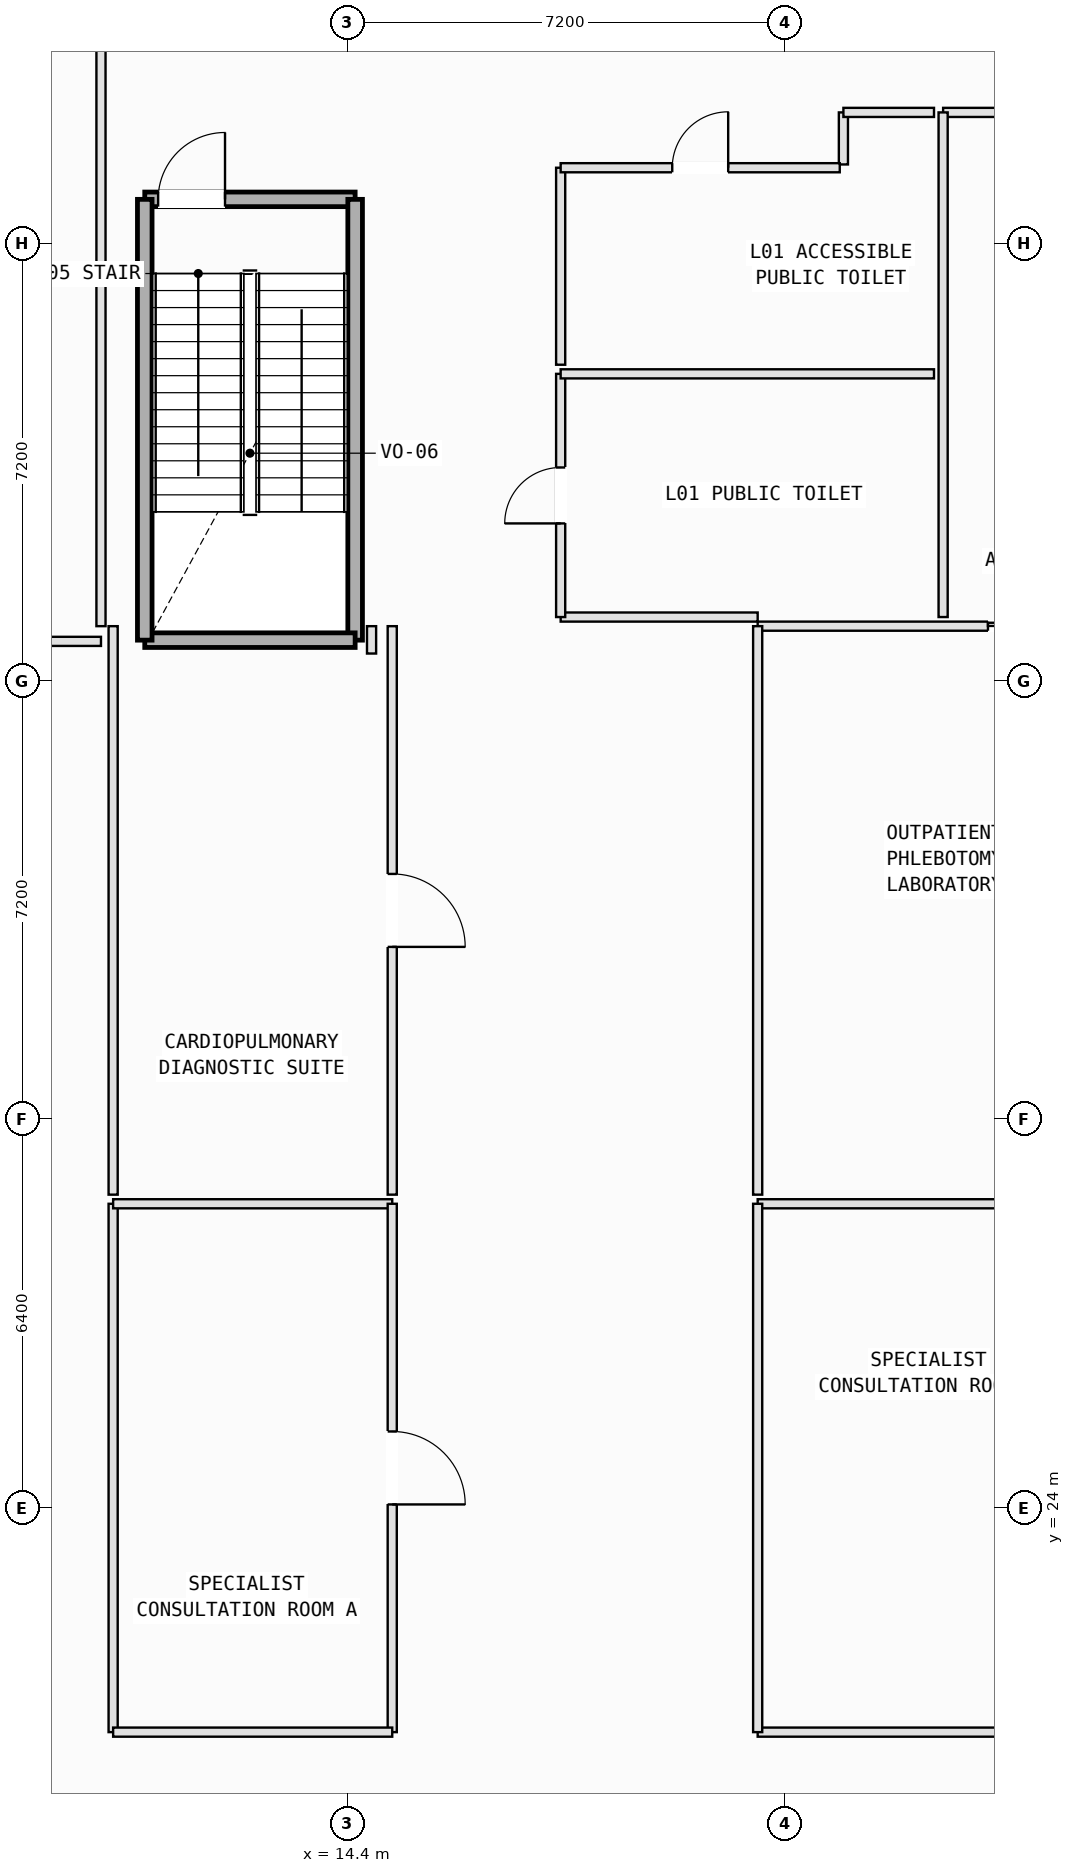
"""IFC4 building model, lengths in metres.
Left out: names, types, materials, properties, quantities, classifications, styles, units other than length and angle.
Written with IfcOpenShell. Run it as: python <this file> out.ifc"""

import sys

from ifc_helpers import new_model, si_unit, direction, frame, frame_2d, origin, place, context, subcontext, project, spatial, rectangle, extrude, element, fill, save


model = new_model("IFC4")
c1 = context("Model", 3, precision=1e-05, world=origin(), true_north=direction((0.0, 1.0)))
c2 = subcontext(c1, "Body", "Model", "MODEL_VIEW")
j1 = project(units=[si_unit("LENGTHUNIT", "METRE"), si_unit("PLANEANGLEUNIT", "RADIAN")], contexts=[c1])
p1 = place(None, origin())
s1 = spatial("IfcSite", under=j1, at=p1, CompositionType="ELEMENT")
p2 = place(p1, origin())
s2 = spatial("IfcBuilding", under=s1, at=p2, CompositionType="ELEMENT")
p3 = place(p2, frame((0.0, 0.0, 5.4)))
s3 = spatial("IfcBuildingStorey", under=s2, at=p3, CompositionType="ELEMENT", Elevation=5.4)
p4 = place(p3, frame((11.07, 45.52, 0.0), z_axis=(0.0, 0.0, 1.0), x_axis=(1.0, 0.0, 0.0)))
e1 = element("IfcWall", 1, at=p4, inside=s3, PredefinedType="SOLIDWALL", context=c2, shape_type="SweptSolid", body=[
    extrude(rectangle(XDim=3.46, YDim=0.24, at=frame_2d((1.73, 0.0))), origin(), (0.0, 0.0, 1.0), 5.15),
])
p5 = place(p4, frame((0.22, 0.0, 0.0)))
e2 = element("IfcOpeningElement", 2, at=p5, cuts=e1, PredefinedType="OPENING", context=c2, shape_type="SweptSolid", body=[
    extrude(rectangle(XDim=1.1, YDim=2.15, at=frame_2d((0.55, 1.075))), frame((0.0, 0.13, 0.0), z_axis=(0.0, -1.0, 0.0), x_axis=(1.0, 0.0, 0.0)), (0.0, 0.0, 1.0), 0.26),
])
p6 = place(p3, frame((14.53, 45.52, 0.0), z_axis=(0.0, 0.0, 1.0), x_axis=(0.0, -1.0, 0.0)))
e3 = element("IfcWall", 3, at=p6, inside=s3, PredefinedType="SOLIDWALL", context=c2, shape_type="SweptSolid", body=[
    extrude(rectangle(XDim=7.25, YDim=0.24, at=frame_2d((3.625, 0.0))), origin(), (0.0, 0.0, 1.0), 5.15),
])
p7 = place(p3, frame((14.53, 38.27, 0.0), z_axis=(0.0, 0.0, 1.0), x_axis=(-1.0, 0.0, 0.0)))
e4 = element("IfcWall", 4, at=p7, inside=s3, PredefinedType="SOLIDWALL", context=c2, shape_type="SweptSolid", body=[
    extrude(rectangle(XDim=3.46, YDim=0.24, at=frame_2d((1.73, 0.0))), origin(), (0.0, 0.0, 1.0), 5.15),
])
p8 = place(p3, frame((11.07, 38.27, 0.0), z_axis=(0.0, 0.0, 1.0), x_axis=(0.0, 1.0, 0.0)))
e5 = element("IfcWall", 5, at=p8, inside=s3, PredefinedType="SOLIDWALL", context=c2, shape_type="SweptSolid", body=[
    extrude(rectangle(XDim=7.25, YDim=0.24, at=frame_2d((3.625, 0.0))), origin(), (0.0, 0.0, 1.0), 5.15),
])
p9 = place(p3, frame((10.55, 20.31, 0.0), z_axis=(0.0, 0.0, 1.0), x_axis=(0.0, 1.0, 0.0)))
e6 = element("IfcWall", 6, at=p9, inside=s3, PredefinedType="PARTITIONING", context=c2, shape_type="SweptSolid", body=[
    extrude(rectangle(XDim=8.69, YDim=0.15, at=frame_2d((4.345, 0.0))), origin(), (0.0, 0.0, 1.0), 5.15),
])
p10 = place(p3, frame((10.55, 29.0, 0.0), z_axis=(0.0, 0.0, 1.0), x_axis=(1.0, 0.0, 0.0)))
e7 = element("IfcWall", 7, at=p10, inside=s3, PredefinedType="PARTITIONING", context=c2, shape_type="SweptSolid", body=[
    extrude(rectangle(XDim=4.59, YDim=0.15, at=frame_2d((2.295, 0.0))), origin(), (0.0, 0.0, 1.0), 5.15),
])
p11 = place(p3, frame((15.14, 29.0, 0.0), z_axis=(0.0, 0.0, 1.0), x_axis=(0.0, -1.0, 0.0)))
e8 = element("IfcWall", 8, at=p11, inside=s3, PredefinedType="PARTITIONING", context=c2, shape_type="SweptSolid", body=[
    extrude(rectangle(XDim=8.69, YDim=0.15, at=frame_2d((4.345, 0.0))), origin(), (0.0, 0.0, 1.0), 5.15),
])
p12 = place(p11, frame((3.745, 0.0, 0.0)))
e9 = element("IfcOpeningElement", 9, at=p12, cuts=e8, PredefinedType="OPENING", context=c2, shape_type="SweptSolid", body=[
    extrude(rectangle(XDim=1.2, YDim=2.15, at=frame_2d((0.6, 1.075))), frame((0.0, 0.085, 0.0), z_axis=(0.0, -1.0, 0.0), x_axis=(1.0, 0.0, 0.0)), (0.0, 0.0, 1.0), 0.17),
])
p13 = place(p3, frame((15.14, 20.31, 0.0), z_axis=(0.0, 0.0, 1.0), x_axis=(-1.0, 0.0, 0.0)))
e10 = element("IfcWall", 10, at=p13, inside=s3, PredefinedType="PARTITIONING", context=c2, shape_type="SweptSolid", body=[
    extrude(rectangle(XDim=4.59, YDim=0.15, at=frame_2d((2.295, 0.0))), origin(), (0.0, 0.0, 1.0), 5.15),
])
p14 = place(p3, frame((21.15, 29.0, 0.0), z_axis=(0.0, 0.0, 1.0), x_axis=(1.0, 0.0, 0.0)))
e11 = element("IfcWall", 11, at=p14, inside=s3, PredefinedType="PARTITIONING", context=c2, shape_type="SweptSolid", body=[
    extrude(rectangle(XDim=10.65, YDim=0.15, at=frame_2d((5.325, 0.0))), origin(), (0.0, 0.0, 1.0), 5.15),
])
p15 = place(p3, frame((31.8, 20.31, 0.0), z_axis=(0.0, 0.0, 1.0), x_axis=(-1.0, 0.0, 0.0)))
e12 = element("IfcWall", 12, at=p15, inside=s3, PredefinedType="PARTITIONING", context=c2, shape_type="SweptSolid", body=[
    extrude(rectangle(XDim=10.65, YDim=0.15, at=frame_2d((5.325, 0.0))), origin(), (0.0, 0.0, 1.0), 5.15),
])
p16 = place(p15, frame((4.725, 0.0, 0.0)))
e13 = element("IfcOpeningElement", 13, at=p16, cuts=e12, PredefinedType="OPENING", context=c2, shape_type="SweptSolid", body=[
    extrude(rectangle(XDim=1.2, YDim=2.15, at=frame_2d((0.6, 1.075))), frame((0.0, 0.085, 0.0), z_axis=(0.0, -1.0, 0.0), x_axis=(1.0, 0.0, 0.0)), (0.0, 0.0, 1.0), 0.17),
])
p17 = place(p3, frame((21.15, 20.31, 0.0), z_axis=(0.0, 0.0, 1.0), x_axis=(0.0, 1.0, 0.0)))
e14 = element("IfcWall", 14, at=p17, inside=s3, PredefinedType="PARTITIONING", context=c2, shape_type="SweptSolid", body=[
    extrude(rectangle(XDim=8.69, YDim=0.15, at=frame_2d((4.345, 0.0))), origin(), (0.0, 0.0, 1.0), 5.15),
])
p18 = place(p3, frame((10.55, 29.15, 0.0), z_axis=(0.0, 0.0, 1.0), x_axis=(0.0, 1.0, 0.0)))
e15 = element("IfcWall", 15, at=p18, inside=s3, PredefinedType="PARTITIONING", context=c2, shape_type="SweptSolid", body=[
    extrude(rectangle(XDim=9.35, YDim=0.15, at=frame_2d((4.675, 0.0))), origin(), (0.0, 0.0, 1.0), 5.15),
])
p19 = place(p3, frame((14.8, 38.05, 0.0), z_axis=(0.0, 0.0, 1.0), x_axis=(0.0, 1.0, 0.0)))
e16 = element("IfcWall", 16, at=p19, inside=s3, PredefinedType="PARTITIONING", context=c2, shape_type="SweptSolid", body=[
    extrude(rectangle(XDim=0.45, YDim=0.15, at=frame_2d((0.225, 0.0))), origin(), (0.0, 0.0, 1.0), 5.15),
])
p20 = place(p3, frame((15.14, 38.5, 0.0), z_axis=(0.0, 0.0, 1.0), x_axis=(0.0, -1.0, 0.0)))
e17 = element("IfcWall", 17, at=p20, inside=s3, PredefinedType="PARTITIONING", context=c2, shape_type="SweptSolid", body=[
    extrude(rectangle(XDim=9.35, YDim=0.15, at=frame_2d((4.675, 0.0))), origin(), (0.0, 0.0, 1.0), 5.15),
])
p21 = place(p20, frame((4.075, 0.0, 0.0)))
e18 = element("IfcOpeningElement", 18, at=p21, cuts=e17, PredefinedType="OPENING", context=c2, shape_type="SweptSolid", body=[
    extrude(rectangle(XDim=1.2, YDim=2.15, at=frame_2d((0.6, 1.075))), frame((0.0, 0.085, 0.0), z_axis=(0.0, -1.0, 0.0), x_axis=(1.0, 0.0, 0.0)), (0.0, 0.0, 1.0), 0.17),
])
p22 = place(p3, frame((21.15, 38.5, 0.0), z_axis=(0.0, 0.0, 1.0), x_axis=(1.0, 0.0, 0.0)))
e19 = element("IfcWall", 19, at=p22, inside=s3, PredefinedType="PARTITIONING", context=c2, shape_type="SweptSolid", body=[
    extrude(rectangle(XDim=10.65, YDim=0.15, at=frame_2d((5.325, 0.0))), origin(), (0.0, 0.0, 1.0), 5.15),
])
p23 = place(p22, frame((3.787, 0.0, 0.0)))
e20 = element("IfcOpeningElement", 20, at=p23, cuts=e19, PredefinedType="OPENING", context=c2, shape_type="SweptSolid", body=[
    extrude(rectangle(XDim=0.86, YDim=2.06, at=frame_2d((0.43, 1.03))), frame((0.0, 0.085, 0.0), z_axis=(0.0, -1.0, 0.0), x_axis=(1.0, 0.0, 0.0)), (0.0, 0.0, 1.0), 0.17),
])
p24 = place(p3, frame((21.15, 29.15, 0.0), z_axis=(0.0, 0.0, 1.0), x_axis=(0.0, 1.0, 0.0)))
e21 = element("IfcWall", 21, at=p24, inside=s3, PredefinedType="PARTITIONING", context=c2, shape_type="SweptSolid", body=[
    extrude(rectangle(XDim=9.35, YDim=0.15, at=frame_2d((4.675, 0.0))), origin(), (0.0, 0.0, 1.0), 5.15),
])
p25 = place(p3, frame((24.2, 46.95, 0.0), z_axis=(0.0, 0.0, 1.0), x_axis=(1.0, 0.0, 0.0)))
e22 = element("IfcWall", 22, at=p25, inside=s3, PredefinedType="PARTITIONING", context=c2, shape_type="SweptSolid", body=[
    extrude(rectangle(XDim=7.6, YDim=0.15, at=frame_2d((3.8, 0.0))), origin(), (0.0, 0.0, 1.0), 5.15),
])
p26 = place(p3, frame((24.2, 38.65, 0.0), z_axis=(0.0, 0.0, 1.0), x_axis=(0.0, 1.0, 0.0)))
e23 = element("IfcWall", 23, at=p26, inside=s3, PredefinedType="PARTITIONING", context=c2, shape_type="SweptSolid", body=[
    extrude(rectangle(XDim=8.3, YDim=0.15, at=frame_2d((4.15, 0.0))), origin(), (0.0, 0.0, 1.0), 5.15),
])
p27 = place(p3, frame((21.15, 38.65, 0.0), z_axis=(0.0, 0.0, 1.0), x_axis=(-1.0, 0.0, 0.0)))
e24 = element("IfcWall", 24, at=p27, inside=s3, PredefinedType="PARTITIONING", context=c2, shape_type="SweptSolid", body=[
    extrude(rectangle(XDim=3.24, YDim=0.15, at=frame_2d((1.62, 0.0))), origin(), (0.0, 0.0, 1.0), 5.15),
])
p28 = place(p3, frame((17.91, 38.65, 0.0), z_axis=(0.0, 0.0, 1.0), x_axis=(0.0, 1.0, 0.0)))
e25 = element("IfcWall", 25, at=p28, inside=s3, PredefinedType="PARTITIONING", context=c2, shape_type="SweptSolid", body=[
    extrude(rectangle(XDim=4.0, YDim=0.15, at=frame_2d((2.0, 0.0))), origin(), (0.0, 0.0, 1.0), 5.15),
])
p29 = place(p28, frame((1.54, 0.0, 0.0)))
e26 = element("IfcOpeningElement", 26, at=p29, cuts=e25, PredefinedType="OPENING", context=c2, shape_type="SweptSolid", body=[
    extrude(rectangle(XDim=0.92, YDim=2.1, at=frame_2d((0.46, 1.05))), frame((0.0, 0.085, 0.0), z_axis=(0.0, -1.0, 0.0), x_axis=(1.0, 0.0, 0.0)), (0.0, 0.0, 1.0), 0.17),
])
p30 = place(p3, frame((17.91, 42.65, 0.0), z_axis=(0.0, 0.0, 1.0), x_axis=(1.0, 0.0, 0.0)))
e27 = element("IfcWall", 27, at=p30, inside=s3, PredefinedType="PARTITIONING", context=c2, shape_type="SweptSolid", body=[
    extrude(rectangle(XDim=6.14, YDim=0.15, at=frame_2d((3.07, 0.0))), origin(), (0.0, 0.0, 1.0), 5.15),
])
p31 = place(p3, frame((22.56, 46.094, 0.0), z_axis=(0.0, 0.0, 1.0), x_axis=(0.0, 1.0, 0.0)))
e28 = element("IfcWall", 28, at=p31, inside=s3, PredefinedType="PARTITIONING", context=c2, shape_type="SweptSolid", body=[
    extrude(rectangle(XDim=0.856, YDim=0.15, at=frame_2d((0.428, 0.0))), origin(), (0.0, 0.0, 1.0), 5.15),
])
p32 = place(p3, frame((22.56, 46.95, 0.0), z_axis=(0.0, 0.0, 1.0), x_axis=(1.0, 0.0, 0.0)))
e29 = element("IfcWall", 29, at=p32, inside=s3, PredefinedType="PARTITIONING", context=c2, shape_type="SweptSolid", body=[
    extrude(rectangle(XDim=1.49, YDim=0.15, at=frame_2d((0.745, 0.0))), origin(), (0.0, 0.0, 1.0), 5.15),
])
p33 = place(p3, frame((17.91, 42.8, 0.0), z_axis=(0.0, 0.0, 1.0), x_axis=(0.0, 1.0, 0.0)))
e30 = element("IfcWall", 30, at=p33, inside=s3, PredefinedType="PARTITIONING", context=c2, shape_type="SweptSolid", body=[
    extrude(rectangle(XDim=3.24, YDim=0.15, at=frame_2d((1.62, 0.0))), origin(), (0.0, 0.0, 1.0), 5.15),
])
p34 = place(p3, frame((17.91, 46.04, 0.0), z_axis=(0.0, 0.0, 1.0), x_axis=(1.0, 0.0, 0.0)))
e31 = element("IfcWall", 31, at=p34, inside=s3, PredefinedType="PARTITIONING", context=c2, shape_type="SweptSolid", body=[
    extrude(rectangle(XDim=4.59, YDim=0.15, at=frame_2d((2.295, 0.0))), origin(), (0.0, 0.0, 1.0), 5.15),
])
p35 = place(p34, frame((1.835, 0.0, 0.0)))
e32 = element("IfcOpeningElement", 32, at=p35, cuts=e31, PredefinedType="OPENING", context=c2, shape_type="SweptSolid", body=[
    extrude(rectangle(XDim=0.92, YDim=2.1, at=frame_2d((0.46, 1.05))), frame((0.0, 0.085, 0.0), z_axis=(0.0, -1.0, 0.0), x_axis=(1.0, 0.0, 0.0)), (0.0, 0.0, 1.0), 0.17),
])
p36 = place(p3, frame((10.35, 38.25, 0.0), z_axis=(0.0, 0.0, 1.0), x_axis=(-1.0, 0.0, 0.0)))
e33 = element("IfcWall", 33, at=p36, inside=s3, PredefinedType="PARTITIONING", context=c2, shape_type="SweptSolid", body=[
    extrude(rectangle(XDim=3.73, YDim=0.15, at=frame_2d((1.865, 0.0))), origin(), (0.0, 0.0, 1.0), 5.15),
])
p37 = place(p36, frame((1.405, 0.0, 0.0)))
e34 = element("IfcOpeningElement", 34, at=p37, cuts=e33, PredefinedType="OPENING", context=c2, shape_type="SweptSolid", body=[
    extrude(rectangle(XDim=0.92, YDim=2.1, at=frame_2d((0.46, 1.05))), frame((0.0, 0.085, 0.0), z_axis=(0.0, -1.0, 0.0), x_axis=(1.0, 0.0, 0.0)), (0.0, 0.0, 1.0), 0.17),
])
p38 = place(p3, frame((10.35, 49.5, 0.0), z_axis=(0.0, 0.0, 1.0), x_axis=(0.0, -1.0, 0.0)))
e35 = element("IfcWall", 35, at=p38, inside=s3, PredefinedType="PARTITIONING", context=c2, shape_type="SweptSolid", body=[
    extrude(rectangle(XDim=11.0, YDim=0.15, at=frame_2d((5.5, 0.0))), origin(), (0.0, 0.0, 1.0), 5.15),
])
p39 = place(p5, origin())
e36 = element("IfcDoor", 36, at=p39, inside=s3, OperationType="SINGLE_SWING_RIGHT", PredefinedType="DOOR", context=c2, shape_type="SweptSolid", body=[
    extrude(rectangle(XDim=1.1, YDim=2.15, at=frame_2d((0.55, 1.075))), frame((0.0, 0.025, 0.0), z_axis=(0.0, -1.0, 0.0), x_axis=(1.0, 0.0, 0.0)), (0.0, 0.0, 1.0), 0.05),
])
fill(e2, e36)
p40 = place(p12, origin())
e37 = element("IfcDoor", 37, at=p40, inside=s3, OperationType="SINGLE_SWING_RIGHT", PredefinedType="DOOR", context=c2, shape_type="SweptSolid", body=[
    extrude(rectangle(XDim=1.2, YDim=2.15, at=frame_2d((0.6, 1.075))), frame((0.0, 0.025, 0.0), z_axis=(0.0, -1.0, 0.0), x_axis=(1.0, 0.0, 0.0)), (0.0, 0.0, 1.0), 0.05),
])
fill(e9, e37)
p41 = place(p21, origin())
e38 = element("IfcDoor", 38, at=p41, inside=s3, OperationType="SINGLE_SWING_RIGHT", PredefinedType="DOOR", context=c2, shape_type="SweptSolid", body=[
    extrude(rectangle(XDim=1.2, YDim=2.15, at=frame_2d((0.6, 1.075))), frame((0.0, 0.025, 0.0), z_axis=(0.0, -1.0, 0.0), x_axis=(1.0, 0.0, 0.0)), (0.0, 0.0, 1.0), 0.05),
])
fill(e18, e38)
p42 = place(p29, origin())
e39 = element("IfcDoor", 39, at=p42, inside=s3, OperationType="SINGLE_SWING_LEFT", PredefinedType="DOOR", context=c2, shape_type="SweptSolid", body=[
    extrude(rectangle(XDim=0.92, YDim=2.1, at=frame_2d((0.46, 1.05))), frame((0.0, 0.025, 0.0), z_axis=(0.0, -1.0, 0.0), x_axis=(1.0, 0.0, 0.0)), (0.0, 0.0, 1.0), 0.05),
])
fill(e26, e39)
p43 = place(p35, origin())
e40 = element("IfcDoor", 40, at=p43, inside=s3, OperationType="SINGLE_SWING_RIGHT", PredefinedType="DOOR", context=c2, shape_type="SweptSolid", body=[
    extrude(rectangle(XDim=0.92, YDim=2.1, at=frame_2d((0.46, 1.05))), frame((0.0, 0.025, 0.0), z_axis=(0.0, -1.0, 0.0), x_axis=(1.0, 0.0, 0.0)), (0.0, 0.0, 1.0), 0.05),
])
fill(e32, e40)
p44 = place(p23, origin())
e41 = element("IfcDoor", 41, at=p44, inside=s3, OperationType="SLIDING_TO_LEFT", PredefinedType="DOOR", context=c2, shape_type="SweptSolid", body=[
    extrude(rectangle(XDim=0.86, YDim=2.06, at=frame_2d((0.43, 1.03))), frame((0.0, 0.025, 0.0), z_axis=(0.0, -1.0, 0.0), x_axis=(1.0, 0.0, 0.0)), (0.0, 0.0, 1.0), 0.05),
])
fill(e20, e41)
save(model, sys.argv[1])
